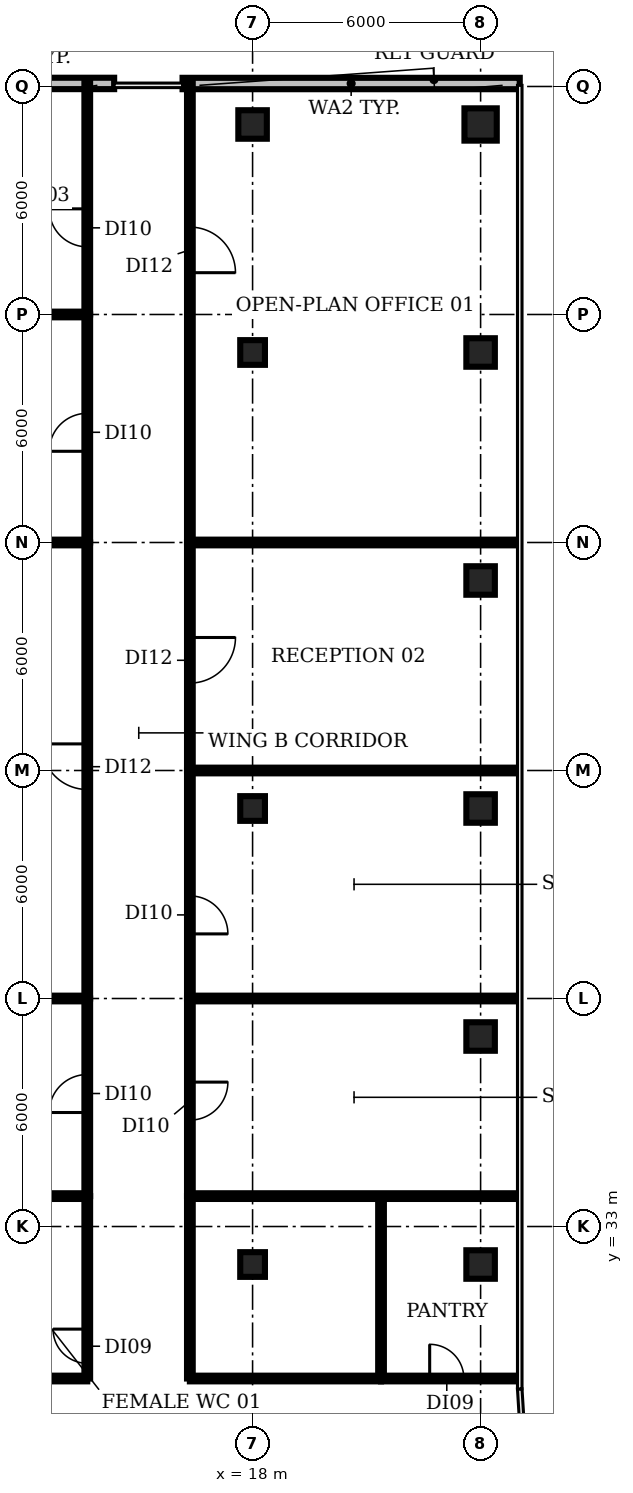
"""IFC4 building model, lengths in metres.
Left out: names, types, materials, properties, quantities, classifications, styles, units other than length and angle.
Written with IfcOpenShell. Run it as: python <this file> out.ifc"""

import sys

from ifc_helpers import new_model, si_unit, direction, frame, frame_2d, origin, origin_2d, place, context, subcontext, project, spatial, rectangle, circle, extrude, element, fill, save


model = new_model("IFC4")
c1 = context("Model", 3, precision=1e-05, world=origin(), true_north=direction((0.0, 1.0)))
c2 = subcontext(c1, "Body", "Model", "MODEL_VIEW")
j1 = project(units=[si_unit("LENGTHUNIT", "METRE"), si_unit("PLANEANGLEUNIT", "RADIAN")], contexts=[c1])
p1 = place(None, origin())
s1 = spatial("IfcSite", under=j1, at=p1, CompositionType="ELEMENT")
p2 = place(p1, origin())
s2 = spatial("IfcBuilding", under=s1, at=p2, CompositionType="ELEMENT")
p3 = place(p2, frame((0.0, 0.0, 302.0)))
s3 = spatial("IfcBuildingStorey", under=s2, at=p3, CompositionType="ELEMENT", Elevation=302.0)
for number, where, z_axis, x_axis in (
    (1, (18.0, 32.0, 0.0), (0.0, 0.0, 1.0), (1.0, 0.0, 0.0)),
    (2, (18.0, 44.0, 0.0), (0.0, 0.0, 1.0), (1.0, 0.0, 0.0)),
    (3, (18.0, 56.0, 0.0), (0.0, 0.0, 1.0), (1.0, 0.0, 0.0)),
):
    element("IfcColumn", number, at=place(p3, frame(where, z_axis=z_axis, x_axis=x_axis)), inside=s3, PredefinedType="COLUMN", context=c2, shape_type="SweptSolid", body=[
        extrude(rectangle(XDim=0.65, YDim=0.65, at=origin_2d()), origin(), (0.0, 0.0, 1.0), 3.85),
    ])
for number, where, z_axis, x_axis in (
    (4, (18.0, 62.0, 0.0), (0.0, 0.0, 1.0), (1.0, 0.0, 0.0)),
    (5, (24.0, 32.0, 0.0), (0.0, 0.0, 1.0), (1.0, 0.0, 0.0)),
    (6, (24.0, 38.0, 0.0), (0.0, 0.0, 1.0), (1.0, 0.0, 0.0)),
    (7, (24.0, 44.0, 0.0), (0.0, 0.0, 1.0), (1.0, 0.0, 0.0)),
    (8, (24.0, 50.0, 0.0), (0.0, 0.0, 1.0), (1.0, 0.0, 0.0)),
    (9, (24.0, 56.0, 0.0), (0.0, 0.0, 1.0), (1.0, 0.0, 0.0)),
):
    element("IfcColumn", number, at=place(p3, frame(where, z_axis=z_axis, x_axis=x_axis)), inside=s3, PredefinedType="COLUMN", context=c2, shape_type="SweptSolid", body=[
        extrude(rectangle(XDim=0.75, YDim=0.75, at=origin_2d()), origin(), (0.0, 0.0, 1.0), 3.85),
    ])
p4 = place(p3, frame((24.0, 62.0, 0.0), z_axis=(0.0, 0.0, 1.0), x_axis=(1.0, 0.0, 0.0)))
e10 = element("IfcColumn", 10, at=p4, inside=s3, PredefinedType="COLUMN", context=c2, shape_type="SweptSolid", body=[
    extrude(circle(Radius=0.425, at=origin_2d()), origin(), (0.0, 0.0, 1.0), 3.85),
])
p5 = place(p3, frame((25.03, 63.078, 0.0), z_axis=(0.0, 0.0, 1.0), x_axis=(-1.0, 0.0, 0.0)))
e11 = element("IfcWall", 11, at=p5, inside=s3, PredefinedType="SOLIDWALL", context=c2, shape_type="SweptSolid", body=[
    extrude(rectangle(XDim=8.873, YDim=0.3, at=frame_2d((4.436, 0.0))), origin(), (0.0, 0.0, 1.0), 3.85),
])
p6 = place(p3, frame((14.357, 63.08, 0.0), z_axis=(0.0, 0.0, 1.0), x_axis=(-1.0, 0.0, 0.0)))
e12 = element("IfcWall", 12, at=p6, inside=s3, PredefinedType="SOLIDWALL", context=c2, shape_type="SweptSolid", body=[
    extrude(rectangle(XDim=4.715, YDim=0.3, at=frame_2d((2.357, 0.0))), origin(), (0.0, 0.0, 1.0), 3.85),
])
p7 = place(p3, frame((-2.76, 57.0, 0.0), z_axis=(0.0, 0.0, 1.0), x_axis=(1.0, 0.0, 0.0)))
e13 = element("IfcWall", 13, at=p7, inside=s3, PredefinedType="PARTITIONING", context=c2, shape_type="SweptSolid", body=[
    extrude(rectangle(XDim=16.41, YDim=0.15, at=frame_2d((8.205, 0.0))), origin(), (0.0, 0.0, 1.0), 2.9),
])
p8 = place(p3, frame((-2.39, 51.0, 0.0), z_axis=(0.0, 0.0, 1.0), x_axis=(1.0, 0.0, 0.0)))
e14 = element("IfcWall", 14, at=p8, inside=s3, PredefinedType="PARTITIONING", context=c2, shape_type="SweptSolid", body=[
    extrude(rectangle(XDim=16.04, YDim=0.15, at=frame_2d((8.02, 0.0))), origin(), (0.0, 0.0, 1.0), 2.9),
])
p9 = place(p3, frame((-1.66, 39.0, 0.0), z_axis=(0.0, 0.0, 1.0), x_axis=(1.0, 0.0, 0.0)))
e15 = element("IfcWall", 15, at=p9, inside=s3, PredefinedType="PARTITIONING", context=c2, shape_type="SweptSolid", body=[
    extrude(rectangle(XDim=15.31, YDim=0.15, at=frame_2d((7.655, 0.0))), origin(), (0.0, 0.0, 1.0), 2.9),
])
p10 = place(p3, frame((-1.34, 33.8, 0.0), z_axis=(0.0, 0.0, 1.0), x_axis=(1.0, 0.0, 0.0)))
e16 = element("IfcWall", 16, at=p10, inside=s3, PredefinedType="PARTITIONING", context=c2, shape_type="SweptSolid", body=[
    extrude(rectangle(XDim=14.99, YDim=0.15, at=frame_2d((7.495, 0.0))), origin(), (0.0, 0.0, 1.0), 2.9),
])
p11 = place(p3, frame((8.8, 29.0, 0.0), z_axis=(0.0, 0.0, 1.0), x_axis=(1.0, 0.0, 0.0)))
e17 = element("IfcWall", 17, at=p11, inside=s3, PredefinedType="PARTITIONING", context=c2, shape_type="SweptSolid", body=[
    extrude(rectangle(XDim=4.85, YDim=0.15, at=frame_2d((2.425, 0.0))), origin(), (0.0, 0.0, 1.0), 2.9),
])
p12 = place(p3, frame((13.65, 29.0, 0.0), z_axis=(0.0, 0.0, 1.0), x_axis=(0.0, 1.0, 0.0)))
e18 = element("IfcWall", 18, at=p12, inside=s3, PredefinedType="PARTITIONING", context=c2, shape_type="SweptSolid", body=[
    extrude(rectangle(XDim=4.8, YDim=0.15, at=frame_2d((2.4, 0.0))), origin(), (0.0, 0.0, 1.0), 2.9),
])
p13 = place(p12, frame((0.4, 0.0, 0.0)))
e19 = element("IfcOpeningElement", 19, at=p13, cuts=e18, PredefinedType="OPENING", context=c2, shape_type="SweptSolid", body=[
    extrude(rectangle(XDim=0.9, YDim=2.1, at=frame_2d((0.45, 1.05))), frame((0.0, 0.085, 0.0), z_axis=(0.0, -1.0, 0.0), x_axis=(1.0, 0.0, 0.0)), (0.0, 0.0, 1.0), 0.17),
])
p14 = place(p3, frame((13.65, 33.8, 0.0), z_axis=(0.0, 0.0, 1.0), x_axis=(0.0, 1.0, 0.0)))
e20 = element("IfcWall", 20, at=p14, inside=s3, PredefinedType="PARTITIONING", context=c2, shape_type="SweptSolid", body=[
    extrude(rectangle(XDim=5.2, YDim=0.15, at=frame_2d((2.6, 0.0))), origin(), (0.0, 0.0, 1.0), 2.9),
])
p15 = place(p14, frame((2.2, 0.0, 0.0)))
e21 = element("IfcOpeningElement", 21, at=p15, cuts=e20, PredefinedType="OPENING", context=c2, shape_type="SweptSolid", body=[
    extrude(rectangle(XDim=1.0, YDim=2.1, at=frame_2d((0.5, 1.05))), frame((0.0, 0.085, 0.0), z_axis=(0.0, -1.0, 0.0), x_axis=(1.0, 0.0, 0.0)), (0.0, 0.0, 1.0), 0.17),
])
p16 = place(p3, frame((13.65, 39.0, 0.0), z_axis=(0.0, 0.0, 1.0), x_axis=(0.0, 1.0, 0.0)))
e22 = element("IfcWall", 22, at=p16, inside=s3, PredefinedType="PARTITIONING", context=c2, shape_type="SweptSolid", body=[
    extrude(rectangle(XDim=12.0, YDim=0.15, at=frame_2d((6.0, 0.0))), origin(), (0.0, 0.0, 1.0), 2.9),
])
p17 = place(p16, frame((5.5, 0.0, 0.0)))
e23 = element("IfcOpeningElement", 23, at=p17, cuts=e22, PredefinedType="OPENING", context=c2, shape_type="SweptSolid", body=[
    extrude(rectangle(XDim=1.2, YDim=2.1, at=frame_2d((0.6, 1.05))), frame((0.0, 0.085, 0.0), z_axis=(0.0, -1.0, 0.0), x_axis=(1.0, 0.0, 0.0)), (0.0, 0.0, 1.0), 0.17),
])
p18 = place(p3, frame((13.65, 51.0, 0.0), z_axis=(0.0, 0.0, 1.0), x_axis=(0.0, 1.0, 0.0)))
e24 = element("IfcWall", 24, at=p18, inside=s3, PredefinedType="PARTITIONING", context=c2, shape_type="SweptSolid", body=[
    extrude(rectangle(XDim=6.0, YDim=0.15, at=frame_2d((3.0, 0.0))), origin(), (0.0, 0.0, 1.0), 2.9),
])
p19 = place(p18, frame((2.4, 0.0, 0.0)))
e25 = element("IfcOpeningElement", 25, at=p19, cuts=e24, PredefinedType="OPENING", context=c2, shape_type="SweptSolid", body=[
    extrude(rectangle(XDim=1.0, YDim=2.1, at=frame_2d((0.5, 1.05))), frame((0.0, 0.085, 0.0), z_axis=(0.0, -1.0, 0.0), x_axis=(1.0, 0.0, 0.0)), (0.0, 0.0, 1.0), 0.17),
])
p20 = place(p3, frame((13.65, 57.0, 0.0), z_axis=(0.0, 0.0, 1.0), x_axis=(0.0, 1.0, 0.0)))
e26 = element("IfcWall", 26, at=p20, inside=s3, PredefinedType="PARTITIONING", context=c2, shape_type="SweptSolid", body=[
    extrude(rectangle(XDim=6.09, YDim=0.15, at=frame_2d((3.045, 0.0))), origin(), (0.0, 0.0, 1.0), 2.9),
])
p21 = place(p20, frame((1.78, 0.0, 0.0)))
e27 = element("IfcOpeningElement", 27, at=p21, cuts=e26, PredefinedType="OPENING", context=c2, shape_type="SweptSolid", body=[
    extrude(rectangle(XDim=1.0, YDim=2.1, at=frame_2d((0.5, 1.05))), frame((0.0, 0.085, 0.0), z_axis=(0.0, -1.0, 0.0), x_axis=(1.0, 0.0, 0.0)), (0.0, 0.0, 1.0), 0.17),
])
p22 = place(p3, frame((16.35, 29.0, 0.0), z_axis=(0.0, 0.0, 1.0), x_axis=(0.0, 1.0, 0.0)))
e28 = element("IfcWall", 28, at=p22, inside=s3, PredefinedType="PARTITIONING", context=c2, shape_type="SweptSolid", body=[
    extrude(rectangle(XDim=4.8, YDim=0.15, at=frame_2d((2.4, 0.0))), origin(), (0.0, 0.0, 1.0), 2.9),
])
p23 = place(p3, frame((16.35, 29.0, 0.0), z_axis=(0.0, 0.0, 1.0), x_axis=(1.0, 0.0, 0.0)))
e29 = element("IfcWall", 29, at=p23, inside=s3, PredefinedType="PARTITIONING", context=c2, shape_type="SweptSolid", body=[
    extrude(rectangle(XDim=5.03, YDim=0.15, at=frame_2d((2.515, 0.0))), origin(), (0.0, 0.0, 1.0), 2.9),
])
p24 = place(p3, frame((16.35, 33.8, 0.0), z_axis=(0.0, 0.0, 1.0), x_axis=(1.0, 0.0, 0.0)))
e30 = element("IfcWall", 30, at=p24, inside=s3, PredefinedType="PARTITIONING", context=c2, shape_type="SweptSolid", body=[
    extrude(rectangle(XDim=8.63, YDim=0.15, at=frame_2d((4.315, 0.0))), origin(), (0.0, 0.0, 1.0), 2.9),
])
p25 = place(p3, frame((16.35, 39.0, 0.0), z_axis=(0.0, 0.0, 1.0), x_axis=(0.0, -1.0, 0.0)))
e31 = element("IfcWall", 31, at=p25, inside=s3, PredefinedType="PARTITIONING", context=c2, shape_type="SweptSolid", body=[
    extrude(rectangle(XDim=5.2, YDim=0.15, at=frame_2d((2.6, 0.0))), origin(), (0.0, 0.0, 1.0), 2.9),
])
p26 = place(p25, frame((2.2, 0.0, 0.0)))
e32 = element("IfcOpeningElement", 32, at=p26, cuts=e31, PredefinedType="OPENING", context=c2, shape_type="SweptSolid", body=[
    extrude(rectangle(XDim=1.0, YDim=2.1, at=frame_2d((0.5, 1.05))), frame((0.0, 0.085, 0.0), z_axis=(0.0, -1.0, 0.0), x_axis=(1.0, 0.0, 0.0)), (0.0, 0.0, 1.0), 0.17),
])
p27 = place(p3, frame((16.35, 39.0, 0.0), z_axis=(0.0, 0.0, 1.0), x_axis=(1.0, 0.0, 0.0)))
e33 = element("IfcWall", 33, at=p27, inside=s3, PredefinedType="PARTITIONING", context=c2, shape_type="SweptSolid", body=[
    extrude(rectangle(XDim=8.63, YDim=0.15, at=frame_2d((4.315, 0.0))), origin(), (0.0, 0.0, 1.0), 2.9),
])
p28 = place(p3, frame((16.35, 45.0, 0.0), z_axis=(0.0, 0.0, 1.0), x_axis=(0.0, -1.0, 0.0)))
e34 = element("IfcWall", 34, at=p28, inside=s3, PredefinedType="PARTITIONING", context=c2, shape_type="SweptSolid", body=[
    extrude(rectangle(XDim=6.0, YDim=0.15, at=frame_2d((3.0, 0.0))), origin(), (0.0, 0.0, 1.0), 2.9),
])
p29 = place(p28, frame((3.3, 0.0, 0.0)))
e35 = element("IfcOpeningElement", 35, at=p29, cuts=e34, PredefinedType="OPENING", context=c2, shape_type="SweptSolid", body=[
    extrude(rectangle(XDim=1.0, YDim=2.1, at=frame_2d((0.5, 1.05))), frame((0.0, 0.085, 0.0), z_axis=(0.0, -1.0, 0.0), x_axis=(1.0, 0.0, 0.0)), (0.0, 0.0, 1.0), 0.17),
])
p30 = place(p3, frame((16.35, 45.0, 0.0), z_axis=(0.0, 0.0, 1.0), x_axis=(1.0, 0.0, 0.0)))
e36 = element("IfcWall", 36, at=p30, inside=s3, PredefinedType="PARTITIONING", context=c2, shape_type="SweptSolid", body=[
    extrude(rectangle(XDim=8.63, YDim=0.15, at=frame_2d((4.315, 0.0))), origin(), (0.0, 0.0, 1.0), 2.9),
])
p31 = place(p3, frame((16.35, 51.0, 0.0), z_axis=(0.0, 0.0, 1.0), x_axis=(0.0, -1.0, 0.0)))
e37 = element("IfcWall", 37, at=p31, inside=s3, PredefinedType="PARTITIONING", context=c2, shape_type="SweptSolid", body=[
    extrude(rectangle(XDim=6.0, YDim=0.15, at=frame_2d((3.0, 0.0))), origin(), (0.0, 0.0, 1.0), 2.9),
])
p32 = place(p31, frame((2.5, 0.0, 0.0)))
e38 = element("IfcOpeningElement", 38, at=p32, cuts=e37, PredefinedType="OPENING", context=c2, shape_type="SweptSolid", body=[
    extrude(rectangle(XDim=1.2, YDim=2.1, at=frame_2d((0.6, 1.05))), frame((0.0, 0.085, 0.0), z_axis=(0.0, -1.0, 0.0), x_axis=(1.0, 0.0, 0.0)), (0.0, 0.0, 1.0), 0.17),
])
p33 = place(p3, frame((16.35, 51.0, 0.0), z_axis=(0.0, 0.0, 1.0), x_axis=(1.0, 0.0, 0.0)))
e39 = element("IfcWall", 39, at=p33, inside=s3, PredefinedType="PARTITIONING", context=c2, shape_type="SweptSolid", body=[
    extrude(rectangle(XDim=8.63, YDim=0.15, at=frame_2d((4.315, 0.0))), origin(), (0.0, 0.0, 1.0), 2.9),
])
p34 = place(p3, frame((16.35, 63.09, 0.0), z_axis=(0.0, 0.0, 1.0), x_axis=(0.0, -1.0, 0.0)))
e40 = element("IfcWall", 40, at=p34, inside=s3, PredefinedType="PARTITIONING", context=c2, shape_type="SweptSolid", body=[
    extrude(rectangle(XDim=12.09, YDim=0.15, at=frame_2d((6.045, 0.0))), origin(), (0.0, 0.0, 1.0), 2.9),
])
p35 = place(p34, frame((3.79, 0.0, 0.0)))
e41 = element("IfcOpeningElement", 41, at=p35, cuts=e40, PredefinedType="OPENING", context=c2, shape_type="SweptSolid", body=[
    extrude(rectangle(XDim=1.2, YDim=2.1, at=frame_2d((0.6, 1.05))), frame((0.0, 0.085, 0.0), z_axis=(0.0, -1.0, 0.0), x_axis=(1.0, 0.0, 0.0)), (0.0, 0.0, 1.0), 0.17),
])
p36 = place(p3, frame((21.38, 29.0, 0.0), z_axis=(0.0, 0.0, 1.0), x_axis=(0.0, 1.0, 0.0)))
e42 = element("IfcWall", 42, at=p36, inside=s3, PredefinedType="PARTITIONING", context=c2, shape_type="SweptSolid", body=[
    extrude(rectangle(XDim=4.8, YDim=0.15, at=frame_2d((2.4, 0.0))), origin(), (0.0, 0.0, 1.0), 2.9),
])
p37 = place(p3, frame((21.38, 29.0, 0.0), z_axis=(0.0, 0.0, 1.0), x_axis=(1.0, 0.0, 0.0)))
e43 = element("IfcWall", 43, at=p37, inside=s3, PredefinedType="PARTITIONING", context=c2, shape_type="SweptSolid", body=[
    extrude(rectangle(XDim=3.58, YDim=0.15, at=frame_2d((1.79, 0.0))), origin(), (0.0, 0.0, 1.0), 2.9),
])
p38 = place(p37, frame((1.28, 0.0, 0.0)))
e44 = element("IfcOpeningElement", 44, at=p38, cuts=e43, PredefinedType="OPENING", context=c2, shape_type="SweptSolid", body=[
    extrude(rectangle(XDim=0.9, YDim=2.1, at=frame_2d((0.45, 1.05))), frame((0.0, 0.085, 0.0), z_axis=(0.0, -1.0, 0.0), x_axis=(1.0, 0.0, 0.0)), (0.0, 0.0, 1.0), 0.17),
])
p39 = place(p13, origin())
e45 = element("IfcDoor", 45, at=p39, inside=s3, OperationType="SINGLE_SWING_RIGHT", PredefinedType="DOOR", context=c2, shape_type="SweptSolid", body=[
    extrude(rectangle(XDim=0.9, YDim=2.1, at=frame_2d((0.45, 1.05))), frame((0.0, 0.025, 0.0), z_axis=(0.0, -1.0, 0.0), x_axis=(1.0, 0.0, 0.0)), (0.0, 0.0, 1.0), 0.05),
])
fill(e19, e45)
p40 = place(p15, origin())
e46 = element("IfcDoor", 46, at=p40, inside=s3, OperationType="SINGLE_SWING_LEFT", PredefinedType="DOOR", context=c2, shape_type="SweptSolid", body=[
    extrude(rectangle(XDim=1.0, YDim=2.1, at=frame_2d((0.5, 1.05))), frame((0.0, 0.025, 0.0), z_axis=(0.0, -1.0, 0.0), x_axis=(1.0, 0.0, 0.0)), (0.0, 0.0, 1.0), 0.05),
])
fill(e21, e46)
p41 = place(p17, origin())
e47 = element("IfcDoor", 47, at=p41, inside=s3, OperationType="SINGLE_SWING_RIGHT", PredefinedType="DOOR", context=c2, shape_type="SweptSolid", body=[
    extrude(rectangle(XDim=1.2, YDim=2.1, at=frame_2d((0.6, 1.05))), frame((0.0, 0.025, 0.0), z_axis=(0.0, -1.0, 0.0), x_axis=(1.0, 0.0, 0.0)), (0.0, 0.0, 1.0), 0.05),
])
fill(e23, e47)
p42 = place(p19, origin())
e48 = element("IfcDoor", 48, at=p42, inside=s3, OperationType="SINGLE_SWING_LEFT", PredefinedType="DOOR", context=c2, shape_type="SweptSolid", body=[
    extrude(rectangle(XDim=1.0, YDim=2.1, at=frame_2d((0.5, 1.05))), frame((0.0, 0.025, 0.0), z_axis=(0.0, -1.0, 0.0), x_axis=(1.0, 0.0, 0.0)), (0.0, 0.0, 1.0), 0.05),
])
fill(e25, e48)
p43 = place(p21, origin())
e49 = element("IfcDoor", 49, at=p43, inside=s3, OperationType="SINGLE_SWING_RIGHT", PredefinedType="DOOR", context=c2, shape_type="SweptSolid", body=[
    extrude(rectangle(XDim=1.0, YDim=2.1, at=frame_2d((0.5, 1.05))), frame((0.0, 0.025, 0.0), z_axis=(0.0, -1.0, 0.0), x_axis=(1.0, 0.0, 0.0)), (0.0, 0.0, 1.0), 0.05),
])
fill(e27, e49)
p44 = place(p26, origin())
e50 = element("IfcDoor", 50, at=p44, inside=s3, OperationType="SINGLE_SWING_LEFT", PredefinedType="DOOR", context=c2, shape_type="SweptSolid", body=[
    extrude(rectangle(XDim=1.0, YDim=2.1, at=frame_2d((0.5, 1.05))), frame((0.0, 0.025, 0.0), z_axis=(0.0, -1.0, 0.0), x_axis=(1.0, 0.0, 0.0)), (0.0, 0.0, 1.0), 0.05),
])
fill(e32, e50)
p45 = place(p29, origin())
e51 = element("IfcDoor", 51, at=p45, inside=s3, OperationType="SINGLE_SWING_RIGHT", PredefinedType="DOOR", context=c2, shape_type="SweptSolid", body=[
    extrude(rectangle(XDim=1.0, YDim=2.1, at=frame_2d((0.5, 1.05))), frame((0.0, 0.025, 0.0), z_axis=(0.0, -1.0, 0.0), x_axis=(1.0, 0.0, 0.0)), (0.0, 0.0, 1.0), 0.05),
])
fill(e35, e51)
p46 = place(p32, origin())
e52 = element("IfcDoor", 52, at=p46, inside=s3, OperationType="SINGLE_SWING_LEFT", PredefinedType="DOOR", context=c2, shape_type="SweptSolid", body=[
    extrude(rectangle(XDim=1.2, YDim=2.1, at=frame_2d((0.6, 1.05))), frame((0.0, 0.025, 0.0), z_axis=(0.0, -1.0, 0.0), x_axis=(1.0, 0.0, 0.0)), (0.0, 0.0, 1.0), 0.05),
])
fill(e38, e52)
p47 = place(p35, origin())
e53 = element("IfcDoor", 53, at=p47, inside=s3, OperationType="SINGLE_SWING_RIGHT", PredefinedType="DOOR", context=c2, shape_type="SweptSolid", body=[
    extrude(rectangle(XDim=1.2, YDim=2.1, at=frame_2d((0.6, 1.05))), frame((0.0, 0.025, 0.0), z_axis=(0.0, -1.0, 0.0), x_axis=(1.0, 0.0, 0.0)), (0.0, 0.0, 1.0), 0.05),
])
fill(e41, e53)
p48 = place(p38, origin())
e54 = element("IfcDoor", 54, at=p48, inside=s3, OperationType="SINGLE_SWING_LEFT", PredefinedType="DOOR", context=c2, shape_type="SweptSolid", body=[
    extrude(rectangle(XDim=0.9, YDim=2.1, at=frame_2d((0.45, 1.05))), frame((0.0, 0.025, 0.0), z_axis=(0.0, -1.0, 0.0), x_axis=(1.0, 0.0, 0.0)), (0.0, 0.0, 1.0), 0.05),
])
fill(e44, e54)
save(model, sys.argv[1])
